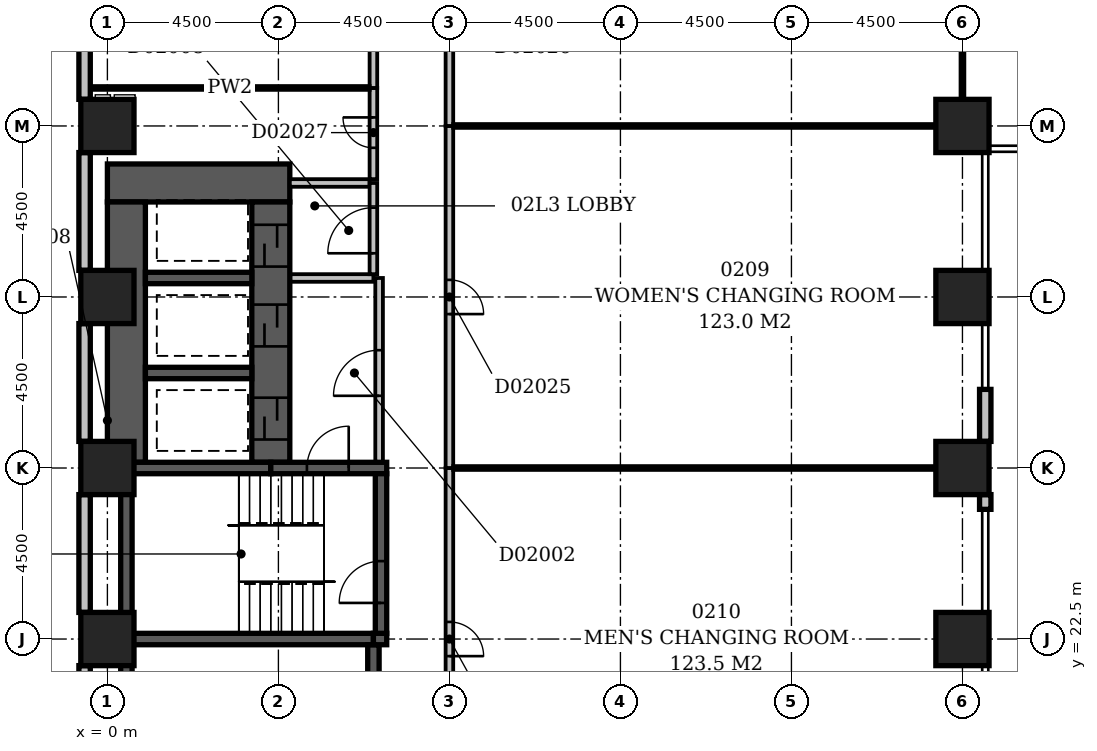
"""IFC4 building model, lengths in metres.
Left out: names, types, materials, properties, quantities, classifications, styles, units other than length and angle.
Written with IfcOpenShell. Run it as: python <this file> out.ifc"""

import sys

from ifc_helpers import new_model, si_unit, direction, frame, frame_2d, origin, origin_2d, place, context, subcontext, project, spatial, rectangle, extrude, element, fill, save


model = new_model("IFC4")
c1 = context("Model", 3, precision=1e-05, world=origin(), true_north=direction((0.0, 1.0)))
c2 = subcontext(c1, "Body", "Model", "MODEL_VIEW")
j1 = project(units=[si_unit("LENGTHUNIT", "METRE"), si_unit("PLANEANGLEUNIT", "RADIAN")], contexts=[c1])
p1 = place(None, origin())
s1 = spatial("IfcSite", under=j1, at=p1, CompositionType="ELEMENT")
p2 = place(p1, origin())
s2 = spatial("IfcBuilding", under=s1, at=p2, CompositionType="ELEMENT")
p3 = place(p2, frame((0.0, 0.0, 14.0)))
s3 = spatial("IfcBuildingStorey", under=s2, at=p3, CompositionType="ELEMENT", Elevation=14.0)
p4 = place(p3, frame((0.0, 34.5, -0.4), z_axis=(0.0, 0.0, 1.0), x_axis=(1.0, 0.0, 0.0)))
e1 = element("IfcWall", 1, at=p4, inside=s3, PredefinedType="SHEAR", context=c2, shape_type="SweptSolid", body=[
    extrude(rectangle(XDim=4.8, YDim=1.0, at=frame_2d((2.4, 0.0))), origin(), (0.0, 0.0, 1.0), 5.0),
])
p5 = place(p3, frame((0.35, 22.5, -0.4), z_axis=(0.0, 0.0, 1.0), x_axis=(1.0, 0.0, 0.0)))
e2 = element("IfcWall", 2, at=p5, inside=s3, PredefinedType="SHEAR", context=c2, shape_type="SweptSolid", body=[
    extrude(rectangle(XDim=6.65, YDim=0.3, at=frame_2d((3.325, 0.0))), origin(), (0.0, 0.0, 1.0), 5.0),
])
p6 = place(p3, frame((0.35, 27.0, -0.4), z_axis=(0.0, 0.0, 1.0), x_axis=(1.0, 0.0, 0.0)))
e3 = element("IfcWall", 3, at=p6, inside=s3, PredefinedType="SHEAR", context=c2, shape_type="SweptSolid", body=[
    extrude(rectangle(XDim=3.95, YDim=0.3, at=frame_2d((1.975, 0.0))), origin(), (0.0, 0.0, 1.0), 5.0),
])
p7 = place(p3, frame((0.5, 18.65, -0.4), z_axis=(0.0, 0.0, 1.0), x_axis=(0.0, 1.0, 0.0)))
e4 = element("IfcWall", 4, at=p7, inside=s3, PredefinedType="SHEAR", context=c2, shape_type="SweptSolid", body=[
    extrude(rectangle(XDim=3.7, YDim=0.3, at=frame_2d((1.85, 0.0))), origin(), (0.0, 0.0, 1.0), 5.0),
])
p8 = place(p3, frame((0.5, 22.65, -0.4), z_axis=(0.0, 0.0, 1.0), x_axis=(0.0, 1.0, 0.0)))
e5 = element("IfcWall", 5, at=p8, inside=s3, PredefinedType="SHEAR", context=c2, shape_type="SweptSolid", body=[
    extrude(rectangle(XDim=4.2, YDim=0.3, at=frame_2d((2.1, 0.0))), origin(), (0.0, 0.0, 1.0), 5.0),
])
p9 = place(p3, frame((0.5, 27.15, -0.4), z_axis=(0.0, 0.0, 1.0), x_axis=(0.0, 1.0, 0.0)))
e6 = element("IfcWall", 6, at=p9, inside=s3, PredefinedType="SHEAR", context=c2, shape_type="SweptSolid", body=[
    extrude(rectangle(XDim=6.85, YDim=1.0, at=frame_2d((3.425, 0.0))), origin(), (0.0, 0.0, 1.0), 5.0),
])
for number, where, z_axis, x_axis in (
    (7, (1.0, 29.5, -0.4), (0.0, 0.0, 1.0), (1.0, 0.0, 0.0)),
    (8, (1.0, 32.0, -0.4), (0.0, 0.0, 1.0), (1.0, 0.0, 0.0)),
):
    element("IfcWall", number, at=place(p3, frame(where, z_axis=z_axis, x_axis=x_axis)), inside=s3, PredefinedType="SHEAR", context=c2, shape_type="SweptSolid", body=[
        extrude(rectangle(XDim=2.8, YDim=0.3, at=frame_2d((1.4, 0.0))), origin(), (0.0, 0.0, 1.0), 5.0),
    ])
p10 = place(p3, frame((4.3, 27.0, -0.4), z_axis=(0.0, 0.0, 1.0), x_axis=(1.0, 0.0, 0.0)))
e9 = element("IfcWall", 9, at=p10, inside=s3, PredefinedType="SHEAR", context=c2, shape_type="SweptSolid", body=[
    extrude(rectangle(XDim=3.05, YDim=0.3, at=frame_2d((1.525, 0.0))), origin(), (0.0, 0.0, 1.0), 5.0),
])
p11 = place(p10, frame((0.95, 0.0, 0.4)))
e10 = element("IfcOpeningElement", 10, at=p11, cuts=e9, PredefinedType="OPENING", context=c2, shape_type="SweptSolid", body=[
    extrude(rectangle(XDim=1.1, YDim=2.1, at=frame_2d((0.55, 1.05))), frame((0.0, 0.162, 0.0), z_axis=(0.0, -1.0, 0.0), x_axis=(1.0, 0.0, 0.0)), (0.0, 0.0, 1.0), 0.324),
])
p12 = place(p3, frame((4.3, 27.15, -0.4), z_axis=(0.0, 0.0, 1.0), x_axis=(0.0, 1.0, 0.0)))
e11 = element("IfcWall", 11, at=p12, inside=s3, PredefinedType="SHEAR", context=c2, shape_type="SweptSolid", body=[
    extrude(rectangle(XDim=6.85, YDim=1.0, at=frame_2d((3.425, 0.0))), origin(), (0.0, 0.0, 1.0), 5.0),
])
p13 = place(p12, frame((3.05, 0.0, 0.4)))
e12 = element("IfcOpeningElement", 12, at=p13, cuts=e11, PredefinedType="OPENING", context=c2, shape_type="SweptSolid", body=[
    extrude(rectangle(XDim=1.1, YDim=2.1, at=frame_2d((0.55, 1.05))), frame((0.0, 0.512, 0.0), z_axis=(0.0, -1.0, 0.0), x_axis=(1.0, 0.0, 0.0)), (0.0, 0.0, 1.0), 1.024),
])
p14 = place(p12, frame((0.6, 0.0, 0.4)))
e13 = element("IfcOpeningElement", 13, at=p14, cuts=e11, PredefinedType="OPENING", context=c2, shape_type="SweptSolid", body=[
    extrude(rectangle(XDim=1.1, YDim=2.1, at=frame_2d((0.55, 1.05))), frame((0.0, 0.512, 0.0), z_axis=(0.0, -1.0, 0.0), x_axis=(1.0, 0.0, 0.0)), (0.0, 0.0, 1.0), 1.024),
])
p15 = place(p12, frame((5.15, 0.0, 0.4)))
e14 = element("IfcOpeningElement", 14, at=p15, cuts=e11, PredefinedType="OPENING", context=c2, shape_type="SweptSolid", body=[
    extrude(rectangle(XDim=1.1, YDim=2.1, at=frame_2d((0.55, 1.05))), frame((0.0, 0.512, 0.0), z_axis=(0.0, -1.0, 0.0), x_axis=(1.0, 0.0, 0.0)), (0.0, 0.0, 1.0), 1.024),
])
p16 = place(p3, frame((7.0, 18.65, -0.4), z_axis=(0.0, 0.0, 1.0), x_axis=(0.0, 1.0, 0.0)))
e15 = element("IfcWall", 15, at=p16, inside=s3, PredefinedType="SHEAR", context=c2, shape_type="SweptSolid", body=[
    extrude(rectangle(XDim=3.7, YDim=0.3, at=frame_2d((1.85, 0.0))), origin(), (0.0, 0.0, 1.0), 5.0),
])
p17 = place(p16, frame((1.35, 0.0, 0.4)))
e16 = element("IfcOpeningElement", 16, at=p17, cuts=e15, PredefinedType="OPENING", context=c2, shape_type="SweptSolid", body=[
    extrude(rectangle(XDim=1.0, YDim=2.1, at=frame_2d((0.5, 1.05))), frame((0.0, 0.162, 0.0), z_axis=(0.0, -1.0, 0.0), x_axis=(1.0, 0.0, 0.0)), (0.0, 0.0, 1.0), 0.324),
])
p18 = place(p3, frame((7.0, 22.5, -0.4), z_axis=(0.0, 0.0, 1.0), x_axis=(1.0, 0.0, 0.0)))
e17 = element("IfcWall", 17, at=p18, inside=s3, PredefinedType="SHEAR", context=c2, shape_type="SweptSolid", body=[
    extrude(rectangle(XDim=0.35, YDim=0.3, at=frame_2d((0.175, 0.0))), origin(), (0.0, 0.0, 1.0), 5.0),
])
p19 = place(p3, frame((7.2, 22.65, -0.4), z_axis=(0.0, 0.0, 1.0), x_axis=(0.0, 1.0, 0.0)))
e18 = element("IfcWall", 18, at=p19, inside=s3, PredefinedType="SHEAR", context=c2, shape_type="SweptSolid", body=[
    extrude(rectangle(XDim=4.2, YDim=0.3, at=frame_2d((2.1, 0.0))), origin(), (0.0, 0.0, 1.0), 5.0),
])
p20 = place(p19, frame((0.8, 0.0, 0.4)))
e19 = element("IfcOpeningElement", 19, at=p20, cuts=e18, PredefinedType="OPENING", context=c2, shape_type="SweptSolid", body=[
    extrude(rectangle(XDim=1.1, YDim=2.1, at=frame_2d((0.55, 1.05))), frame((0.0, 0.162, 0.0), z_axis=(0.0, -1.0, 0.0), x_axis=(1.0, 0.0, 0.0)), (0.0, 0.0, 1.0), 0.324),
])
for number, where, z_axis, x_axis in (
    (20, (0.0, 22.5, -0.4), (0.0, 0.0, 1.0), (1.0, 0.0, 0.0)),
    (21, (22.5, 22.5, -0.4), (0.0, 0.0, 1.0), (1.0, 0.0, 0.0)),
    (22, (0.0, 27.0, -0.4), (0.0, 0.0, 1.0), (1.0, 0.0, 0.0)),
    (23, (22.5, 27.0, -0.4), (0.0, 0.0, 1.0), (1.0, 0.0, 0.0)),
    (24, (0.0, 31.5, -0.4), (0.0, 0.0, 1.0), (1.0, 0.0, 0.0)),
    (25, (22.5, 31.5, -0.4), (0.0, 0.0, 1.0), (1.0, 0.0, 0.0)),
    (26, (0.0, 36.0, -0.4), (0.0, 0.0, 1.0), (1.0, 0.0, 0.0)),
    (27, (22.5, 36.0, -0.4), (0.0, 0.0, 1.0), (1.0, 0.0, 0.0)),
):
    element("IfcColumn", number, at=place(p3, frame(where, z_axis=z_axis, x_axis=x_axis)), inside=s3, PredefinedType="COLUMN", context=c2, shape_type="SweptSolid", body=[
        extrude(rectangle(XDim=1.4, YDim=1.4, at=origin_2d()), origin(), (0.0, 0.0, 1.0), 5.0),
    ])
p21 = place(p3, frame((23.1, 25.912, 0.0), z_axis=(0.0, 0.0, 1.0), x_axis=(0.0, 1.0, 0.0)))
e28 = element("IfcWall", 28, at=p21, inside=s3, PredefinedType="STANDARD", context=c2, shape_type="SweptSolid", body=[
    extrude(rectangle(XDim=0.388, YDim=0.3, at=frame_2d((0.194, 0.0))), origin(), (0.0, 0.0, 1.0), 3.9),
])
p22 = place(p3, frame((23.1, 27.7, 0.0), z_axis=(0.0, 0.0, 1.0), x_axis=(0.0, 1.0, 0.0)))
e29 = element("IfcWall", 29, at=p22, inside=s3, PredefinedType="STANDARD", context=c2, shape_type="SweptSolid", body=[
    extrude(rectangle(XDim=1.369, YDim=0.3, at=frame_2d((0.684, 0.0))), origin(), (0.0, 0.0, 1.0), 3.9),
])
for number, where, z_axis, x_axis in (
    (30, (-0.6, 39.8, 0.0), (0.0, 0.0, 1.0), (0.0, -1.0, 0.0)),
    (31, (-0.6, 35.3, 0.0), (0.0, 0.0, 1.0), (0.0, -1.0, 0.0)),
    (32, (-0.6, 30.8, 0.0), (0.0, 0.0, 1.0), (0.0, -1.0, 0.0)),
    (33, (-0.6, 26.3, 0.0), (0.0, 0.0, 1.0), (0.0, -1.0, 0.0)),
    (34, (-0.6, 21.8, 0.0), (0.0, 0.0, 1.0), (0.0, -1.0, 0.0)),
):
    element("IfcWall", number, at=place(p3, frame(where, z_axis=z_axis, x_axis=x_axis)), inside=s3, PredefinedType="STANDARD", context=c2, shape_type="SweptSolid", body=[
        extrude(rectangle(XDim=3.1, YDim=0.3, at=frame_2d((1.55, 0.0))), origin(), (0.0, 0.0, 1.0), 3.9),
    ])
p23 = place(p3, frame((4.82, 32.0, 0.0), z_axis=(0.0, 0.0, 1.0), x_axis=(1.0, 0.0, 0.0)))
e35 = element("IfcWall", 35, at=p23, inside=s3, PredefinedType="PARTITIONING", context=c2, shape_type="SweptSolid", body=[
    extrude(rectangle(XDim=2.18, YDim=0.2, at=frame_2d((1.09, 0.0))), origin(), (0.0, 0.0, 1.0), 4.6),
])
p24 = place(p3, frame((7.0, 32.1, 0.0), z_axis=(0.0, 0.0, 1.0), x_axis=(0.0, 1.0, 0.0)))
e36 = element("IfcWall", 36, at=p24, inside=s3, PredefinedType="PARTITIONING", context=c2, shape_type="SweptSolid", body=[
    extrude(rectangle(XDim=2.4, YDim=0.2, at=frame_2d((1.2, 0.0))), origin(), (0.0, 0.0, 1.0), 4.6),
])
p25 = place(p24, frame((0.55, 0.0, 0.0)))
e37 = element("IfcOpeningElement", 37, at=p25, cuts=e36, PredefinedType="OPENING", context=c2, shape_type="SweptSolid", body=[
    extrude(rectangle(XDim=1.2, YDim=2.1, at=frame_2d((0.6, 1.05))), frame((0.0, 0.112, 0.0), z_axis=(0.0, -1.0, 0.0), x_axis=(1.0, 0.0, 0.0)), (0.0, 0.0, 1.0), 0.224),
])
p26 = place(p3, frame((4.8, 34.5, 0.0), z_axis=(0.0, 0.0, 1.0), x_axis=(1.0, 0.0, 0.0)))
e38 = element("IfcWall", 38, at=p26, inside=s3, PredefinedType="PARTITIONING", context=c2, shape_type="SweptSolid", body=[
    extrude(rectangle(XDim=2.1, YDim=0.2, at=frame_2d((1.05, 0.0))), origin(), (0.0, 0.0, 1.0), 4.6),
])
p27 = place(p3, frame((7.15, 27.17, 0.0), z_axis=(0.0, 0.0, 1.0), x_axis=(0.0, 1.0, 0.0)))
e39 = element("IfcWall", 39, at=p27, inside=s3, PredefinedType="PARTITIONING", context=c2, shape_type="SweptSolid", body=[
    extrude(rectangle(XDim=4.83, YDim=0.2, at=frame_2d((2.415, 0.0))), origin(), (0.0, 0.0, 1.0), 4.6),
])
p28 = place(p27, frame((1.73, 0.0, 0.0)))
e40 = element("IfcOpeningElement", 40, at=p28, cuts=e39, PredefinedType="OPENING", context=c2, shape_type="SweptSolid", body=[
    extrude(rectangle(XDim=1.2, YDim=2.1, at=frame_2d((0.6, 1.05))), frame((0.0, 0.112, 0.0), z_axis=(0.0, -1.0, 0.0), x_axis=(1.0, 0.0, 0.0)), (0.0, 0.0, 1.0), 0.224),
])
p29 = place(p3, frame((9.0, 18.0, 0.0), z_axis=(0.0, 0.0, 1.0), x_axis=(0.0, 1.0, 0.0)))
e41 = element("IfcWall", 41, at=p29, inside=s3, PredefinedType="PARTITIONING", context=c2, shape_type="SweptSolid", body=[
    extrude(rectangle(XDim=9.0, YDim=0.2, at=frame_2d((4.5, 0.0))), origin(), (0.0, 0.0, 1.0), 4.6),
])
p30 = place(p29, frame((4.05, 0.0, 0.0)))
e42 = element("IfcOpeningElement", 42, at=p30, cuts=e41, PredefinedType="OPENING", context=c2, shape_type="SweptSolid", body=[
    extrude(rectangle(XDim=0.9, YDim=2.1, at=frame_2d((0.45, 1.05))), frame((0.0, 0.112, 0.0), z_axis=(0.0, -1.0, 0.0), x_axis=(1.0, 0.0, 0.0)), (0.0, 0.0, 1.0), 0.224),
])
p31 = place(p3, frame((9.0, 27.0, 0.0), z_axis=(0.0, 0.0, 1.0), x_axis=(0.0, 1.0, 0.0)))
e43 = element("IfcWall", 43, at=p31, inside=s3, PredefinedType="PARTITIONING", context=c2, shape_type="SweptSolid", body=[
    extrude(rectangle(XDim=9.0, YDim=0.2, at=frame_2d((4.5, 0.0))), origin(), (0.0, 0.0, 1.0), 4.6),
])
p32 = place(p31, frame((4.05, 0.0, 0.0)))
e44 = element("IfcOpeningElement", 44, at=p32, cuts=e43, PredefinedType="OPENING", context=c2, shape_type="SweptSolid", body=[
    extrude(rectangle(XDim=0.9, YDim=2.1, at=frame_2d((0.45, 1.05))), frame((0.0, 0.112, 0.0), z_axis=(0.0, -1.0, 0.0), x_axis=(1.0, 0.0, 0.0)), (0.0, 0.0, 1.0), 0.224),
])
p33 = place(p3, frame((22.5, 27.0, 0.0), z_axis=(0.0, 0.0, 1.0), x_axis=(-1.0, 0.0, 0.0)))
e45 = element("IfcWall", 45, at=p33, inside=s3, PredefinedType="PARTITIONING", context=c2, shape_type="SweptSolid", body=[
    extrude(rectangle(XDim=13.4, YDim=0.1, at=frame_2d((6.7, 0.0))), origin(), (0.0, 0.0, 1.0), 4.0),
])
p34 = place(p3, frame((22.5, 35.35, 0.0), z_axis=(0.0, 0.0, 1.0), x_axis=(0.0, 1.0, 0.0)))
e46 = element("IfcWall", 46, at=p34, inside=s3, PredefinedType="PARTITIONING", context=c2, shape_type="SweptSolid", body=[
    extrude(rectangle(XDim=0.6, YDim=0.1, at=frame_2d((0.3, 0.0))), origin(), (0.0, 0.0, 1.0), 3.9),
])
p35 = place(p3, frame((9.0, 36.0, 0.0), z_axis=(0.0, 0.0, 1.0), x_axis=(0.0, 1.0, 0.0)))
e47 = element("IfcWall", 47, at=p35, inside=s3, PredefinedType="PARTITIONING", context=c2, shape_type="SweptSolid", body=[
    extrude(rectangle(XDim=6.5, YDim=0.2, at=frame_2d((3.25, 0.0))), origin(), (0.0, 0.0, 1.0), 4.6),
])
p36 = place(p35, frame((2.35, 0.0, 0.0)))
e48 = element("IfcOpeningElement", 48, at=p36, cuts=e47, PredefinedType="OPENING", context=c2, shape_type="SweptSolid", body=[
    extrude(rectangle(XDim=1.8, YDim=2.4, at=frame_2d((0.9, 1.2))), frame((0.0, 0.112, 0.0), z_axis=(0.0, -1.0, 0.0), x_axis=(1.0, 0.0, 0.0)), (0.0, 0.0, 1.0), 0.224),
])
p37 = place(p3, frame((22.55, 36.0, 0.0), z_axis=(0.0, 0.0, 1.0), x_axis=(-1.0, 0.0, 0.0)))
e49 = element("IfcWall", 49, at=p37, inside=s3, PredefinedType="PARTITIONING", context=c2, shape_type="SweptSolid", body=[
    extrude(rectangle(XDim=13.45, YDim=0.1, at=frame_2d((6.725, 0.0))), origin(), (0.0, 0.0, 1.0), 3.7),
])
p38 = place(p3, frame((22.5, 36.05, 0.0), z_axis=(0.0, 0.0, 1.0), x_axis=(0.0, 1.0, 0.0)))
e50 = element("IfcWall", 50, at=p38, inside=s3, PredefinedType="PARTITIONING", context=c2, shape_type="SweptSolid", body=[
    extrude(rectangle(XDim=6.4, YDim=0.1, at=frame_2d((3.2, 0.0))), origin(), (0.0, 0.0, 1.0), 4.6),
])
p39 = place(p3, frame((-0.45, 37.0, 0.0), z_axis=(0.0, 0.0, 1.0), x_axis=(1.0, 0.0, 0.0)))
e51 = element("IfcWall", 51, at=p39, inside=s3, PredefinedType="PARTITIONING", context=c2, shape_type="SweptSolid", body=[
    extrude(rectangle(XDim=7.35, YDim=0.1, at=frame_2d((3.675, 0.0))), origin(), (0.0, 0.0, 1.0), 4.6),
])
p40 = place(p3, frame((7.0, 37.0, 0.0), z_axis=(0.0, 0.0, 1.0), x_axis=(0.0, -1.0, 0.0)))
e52 = element("IfcWall", 52, at=p40, inside=s3, PredefinedType="PARTITIONING", context=c2, shape_type="SweptSolid", body=[
    extrude(rectangle(XDim=2.4, YDim=0.2, at=frame_2d((1.2, 0.0))), origin(), (0.0, 0.0, 1.0), 4.6),
])
p41 = place(p40, frame((0.775, 0.0, 0.0)))
e53 = element("IfcOpeningElement", 53, at=p41, cuts=e52, PredefinedType="OPENING", context=c2, shape_type="SweptSolid", body=[
    extrude(rectangle(XDim=0.8, YDim=2.1, at=frame_2d((0.4, 1.05))), frame((0.0, 0.112, 0.0), z_axis=(0.0, -1.0, 0.0), x_axis=(1.0, 0.0, 0.0)), (0.0, 0.0, 1.0), 0.224),
])
p42 = place(p3, frame((7.0, 43.0, 0.0), z_axis=(0.0, 0.0, 1.0), x_axis=(0.0, -1.0, 0.0)))
e54 = element("IfcWall", 54, at=p42, inside=s3, PredefinedType="PARTITIONING", context=c2, shape_type="SweptSolid", body=[
    extrude(rectangle(XDim=6.0, YDim=0.2, at=frame_2d((3.0, 0.0))), origin(), (0.0, 0.0, 1.0), 4.6),
])
p43 = place(p42, frame((2.55, 0.0, 0.0)))
e55 = element("IfcOpeningElement", 55, at=p43, cuts=e54, PredefinedType="OPENING", context=c2, shape_type="SweptSolid", body=[
    extrude(rectangle(XDim=0.9, YDim=2.1, at=frame_2d((0.45, 1.05))), frame((0.0, 0.112, 0.0), z_axis=(0.0, -1.0, 0.0), x_axis=(1.0, 0.0, 0.0)), (0.0, 0.0, 1.0), 0.224),
])
p44 = place(p28, origin())
e56 = element("IfcDoor", 56, at=p44, inside=s3, OperationType="SINGLE_SWING_LEFT", PredefinedType="DOOR", context=c2, shape_type="SweptSolid", body=[
    extrude(rectangle(XDim=1.2, YDim=2.1, at=frame_2d((0.6, 1.05))), frame((0.0, 0.025, 0.0), z_axis=(0.0, -1.0, 0.0), x_axis=(1.0, 0.0, 0.0)), (0.0, 0.0, 1.0), 0.05),
])
fill(e40, e56)
p45 = place(p13, origin())
e57 = element("IfcDoor", 57, at=p45, inside=s3, OperationType="SLIDING_TO_LEFT", PredefinedType="DOOR", context=c2, shape_type="SweptSolid", body=[
    extrude(rectangle(XDim=1.1, YDim=2.1, at=frame_2d((0.55, 1.05))), frame((0.0, 0.025, 0.0), z_axis=(0.0, -1.0, 0.0), x_axis=(1.0, 0.0, 0.0)), (0.0, 0.0, 1.0), 0.05),
])
fill(e12, e57)
p46 = place(p14, origin())
e58 = element("IfcDoor", 58, at=p46, inside=s3, OperationType="SLIDING_TO_LEFT", PredefinedType="DOOR", context=c2, shape_type="SweptSolid", body=[
    extrude(rectangle(XDim=1.1, YDim=2.1, at=frame_2d((0.55, 1.05))), frame((0.0, 0.025, 0.0), z_axis=(0.0, -1.0, 0.0), x_axis=(1.0, 0.0, 0.0)), (0.0, 0.0, 1.0), 0.05),
])
fill(e13, e58)
p47 = place(p25, origin())
e59 = element("IfcDoor", 59, at=p47, inside=s3, OperationType="SINGLE_SWING_LEFT", PredefinedType="DOOR", context=c2, shape_type="SweptSolid", body=[
    extrude(rectangle(XDim=1.2, YDim=2.1, at=frame_2d((0.6, 1.05))), frame((0.0, 0.025, 0.0), z_axis=(0.0, -1.0, 0.0), x_axis=(1.0, 0.0, 0.0)), (0.0, 0.0, 1.0), 0.05),
])
fill(e37, e59)
p48 = place(p15, origin())
e60 = element("IfcDoor", 60, at=p48, inside=s3, OperationType="SLIDING_TO_LEFT", PredefinedType="DOOR", context=c2, shape_type="SweptSolid", body=[
    extrude(rectangle(XDim=1.1, YDim=2.1, at=frame_2d((0.55, 1.05))), frame((0.0, 0.025, 0.0), z_axis=(0.0, -1.0, 0.0), x_axis=(1.0, 0.0, 0.0)), (0.0, 0.0, 1.0), 0.05),
])
fill(e14, e60)
p49 = place(p11, frame((1.1, 0.0, 0.0), z_axis=(0.0, 0.0, 1.0), x_axis=(-1.0, 0.0, 0.0)))
e61 = element("IfcDoor", 61, at=p49, inside=s3, OperationType="SINGLE_SWING_LEFT", PredefinedType="DOOR", context=c2, shape_type="SweptSolid", body=[
    extrude(rectangle(XDim=1.1, YDim=2.1, at=frame_2d((0.55, 1.05))), frame((0.0, 0.025, 0.0), z_axis=(0.0, -1.0, 0.0), x_axis=(1.0, 0.0, 0.0)), (0.0, 0.0, 1.0), 0.05),
])
fill(e10, e61)
p50 = place(p20, origin())
e62 = element("IfcDoor", 62, at=p50, inside=s3, OperationType="SINGLE_SWING_LEFT", PredefinedType="DOOR", context=c2, shape_type="SweptSolid", body=[
    extrude(rectangle(XDim=1.1, YDim=2.1, at=frame_2d((0.55, 1.05))), frame((0.0, 0.025, 0.0), z_axis=(0.0, -1.0, 0.0), x_axis=(1.0, 0.0, 0.0)), (0.0, 0.0, 1.0), 0.05),
])
fill(e19, e62)
p51 = place(p30, frame((0.9, 0.0, 0.0), z_axis=(0.0, 0.0, 1.0), x_axis=(-1.0, 0.0, 0.0)))
e63 = element("IfcDoor", 63, at=p51, inside=s3, OperationType="SINGLE_SWING_RIGHT", PredefinedType="DOOR", context=c2, shape_type="SweptSolid", body=[
    extrude(rectangle(XDim=0.9, YDim=2.1, at=frame_2d((0.45, 1.05))), frame((0.0, 0.025, 0.0), z_axis=(0.0, -1.0, 0.0), x_axis=(1.0, 0.0, 0.0)), (0.0, 0.0, 1.0), 0.05),
])
fill(e42, e63)
p52 = place(p32, frame((0.9, 0.0, 0.0), z_axis=(0.0, 0.0, 1.0), x_axis=(-1.0, 0.0, 0.0)))
e64 = element("IfcDoor", 64, at=p52, inside=s3, OperationType="SINGLE_SWING_RIGHT", PredefinedType="DOOR", context=c2, shape_type="SweptSolid", body=[
    extrude(rectangle(XDim=0.9, YDim=2.1, at=frame_2d((0.45, 1.05))), frame((0.0, 0.025, 0.0), z_axis=(0.0, -1.0, 0.0), x_axis=(1.0, 0.0, 0.0)), (0.0, 0.0, 1.0), 0.05),
])
fill(e44, e64)
p53 = place(p41, frame((0.8, 0.0, 0.0), z_axis=(0.0, 0.0, 1.0), x_axis=(-1.0, 0.0, 0.0)))
e65 = element("IfcDoor", 65, at=p53, inside=s3, OperationType="SINGLE_SWING_RIGHT", PredefinedType="DOOR", context=c2, shape_type="SweptSolid", body=[
    extrude(rectangle(XDim=0.8, YDim=2.1, at=frame_2d((0.4, 1.05))), frame((0.0, 0.025, 0.0), z_axis=(0.0, -1.0, 0.0), x_axis=(1.0, 0.0, 0.0)), (0.0, 0.0, 1.0), 0.05),
])
fill(e53, e65)
save(model, sys.argv[1])
